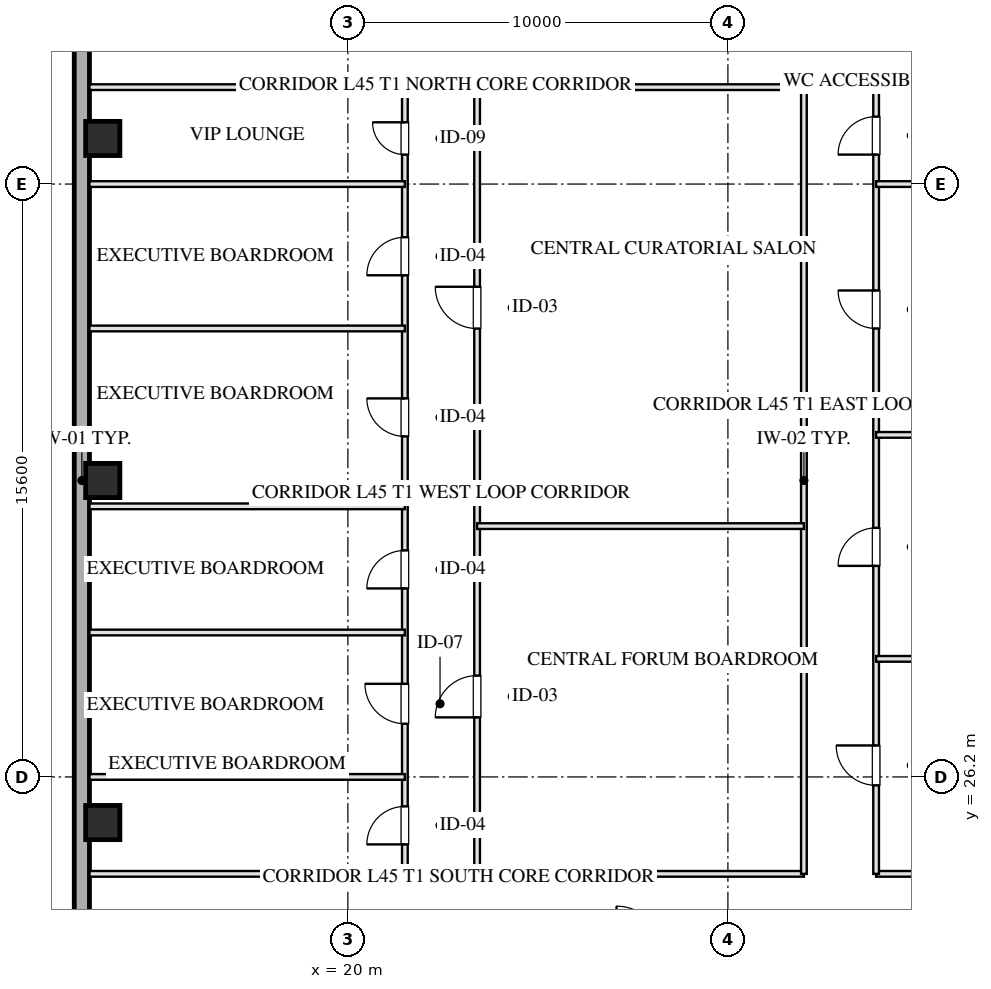
"""IFC4 building model, lengths in metres.
Left out: names, types, materials, properties, quantities, classifications, styles, units other than length and angle.
Written with IfcOpenShell. Run it as: python <this file> out.ifc"""

import sys

from ifc_helpers import new_model, si_unit, direction, frame, frame_2d, origin, origin_2d, place, context, subcontext, project, spatial, rectangle, hollow_rectangle, extrude, element, fill, save


model = new_model("IFC4")
c1 = context("Model", 3, precision=1e-05, world=origin(), true_north=direction((0.0, 1.0)))
c2 = subcontext(c1, "Body", "Model", "MODEL_VIEW")
j1 = project(units=[si_unit("LENGTHUNIT", "METRE"), si_unit("PLANEANGLEUNIT", "RADIAN")], contexts=[c1])
p1 = place(None, origin())
s1 = spatial("IfcSite", under=j1, at=p1, CompositionType="ELEMENT")
p2 = place(p1, origin())
s2 = spatial("IfcBuilding", under=s1, at=p2, CompositionType="ELEMENT")
p3 = place(p2, frame((0.0, 0.0, 170.2)))
s3 = spatial("IfcBuildingStorey", under=s2, at=p3, CompositionType="ELEMENT", Elevation=170.2)
for number, where, z_axis, x_axis in (
    (1, (13.55, 25.0, 0.0), (0.0, 0.0, 1.0), (1.0, 0.0, 0.0)),
    (2, (13.55, 34.0, 0.0), (0.0, 0.0, 1.0), (1.0, 0.0, 0.0)),
    (3, (13.55, 43.0, 0.0), (0.0, 0.0, 1.0), (1.0, 0.0, 0.0)),
):
    element("IfcColumn", number, at=place(p3, frame(where, z_axis=z_axis, x_axis=x_axis)), inside=s3, PredefinedType="COLUMN", context=c2, shape_type="SweptSolid", body=[
        extrude(hollow_rectangle(XDim=0.9, YDim=0.9, WallThickness=0.032, at=origin_2d()), origin(), (0.0, 0.0, 1.0), 3.451),
    ])
p4 = place(p3, frame((13.0, 10.8, 0.0), z_axis=(0.0, 0.0, 1.0), x_axis=(0.0, 1.0, 0.0)))
e4 = element("IfcWall", 4, at=p4, inside=s3, PredefinedType="SOLIDWALL", context=c2, shape_type="SweptSolid", body=[
    extrude(rectangle(XDim=46.4, YDim=0.4, at=frame_2d((23.2, 0.0))), origin(), (0.0, 0.0, 1.0), 2.61),
])
p5 = place(p3, frame((13.2, 23.65, 0.0), z_axis=(0.0, 0.0, 1.0), x_axis=(1.0, 0.0, 0.0)))
e5 = element("IfcWall", 5, at=p5, inside=s3, PredefinedType="PARTITIONING", context=c2, shape_type="SweptSolid", body=[
    extrude(rectangle(XDim=8.3, YDim=0.15, at=frame_2d((4.15, 0.0))), origin(), (0.0, 0.0, 1.0), 3.175),
])
p6 = place(p3, frame((23.4, 23.65, 0.0), z_axis=(0.0, 0.0, 1.0), x_axis=(1.0, 0.0, 0.0)))
e6 = element("IfcWall", 6, at=p6, inside=s3, PredefinedType="PARTITIONING", context=c2, shape_type="SweptSolid", body=[
    extrude(rectangle(XDim=8.6, YDim=0.15, at=frame_2d((4.3, 0.0))), origin(), (0.0, 0.0, 1.0), 3.175),
])
p7 = place(p3, frame((33.9, 23.65, 0.0), z_axis=(0.0, 0.0, 1.0), x_axis=(1.0, 0.0, 0.0)))
e7 = element("IfcWall", 7, at=p7, inside=s3, PredefinedType="PARTITIONING", context=c2, shape_type="SweptSolid", body=[
    extrude(rectangle(XDim=12.9, YDim=0.15, at=frame_2d((6.45, 0.0))), origin(), (0.0, 0.0, 1.0), 3.175),
])
p8 = place(p3, frame((13.2, 44.35, 0.0), z_axis=(0.0, 0.0, 1.0), x_axis=(1.0, 0.0, 0.0)))
e8 = element("IfcWall", 8, at=p8, inside=s3, PredefinedType="PARTITIONING", context=c2, shape_type="SweptSolid", body=[
    extrude(rectangle(XDim=8.3, YDim=0.15, at=frame_2d((4.15, 0.0))), origin(), (0.0, 0.0, 1.0), 3.175),
])
p9 = place(p3, frame((23.4, 44.35, 0.0), z_axis=(0.0, 0.0, 1.0), x_axis=(1.0, 0.0, 0.0)))
e9 = element("IfcWall", 9, at=p9, inside=s3, PredefinedType="PARTITIONING", context=c2, shape_type="SweptSolid", body=[
    extrude(rectangle(XDim=8.6, YDim=0.15, at=frame_2d((4.3, 0.0))), origin(), (0.0, 0.0, 1.0), 3.175),
])
p10 = place(p3, frame((33.9, 44.35, 0.0), z_axis=(0.0, 0.0, 1.0), x_axis=(1.0, 0.0, 0.0)))
e10 = element("IfcWall", 10, at=p10, inside=s3, PredefinedType="PARTITIONING", context=c2, shape_type="SweptSolid", body=[
    extrude(rectangle(XDim=12.9, YDim=0.15, at=frame_2d((6.45, 0.0))), origin(), (0.0, 0.0, 1.0), 3.175),
])
p11 = place(p3, frame((21.5, 23.65, 0.0), z_axis=(0.0, 0.0, 1.0), x_axis=(0.0, 1.0, 0.0)))
e11 = element("IfcWall", 11, at=p11, inside=s3, PredefinedType="PARTITIONING", context=c2, shape_type="SweptSolid", body=[
    extrude(rectangle(XDim=20.7, YDim=0.15, at=frame_2d((10.35, 0.0))), origin(), (0.0, 0.0, 1.0), 3.175),
])
p12 = place(p11, frame((0.775, 0.0, 0.0)))
e12 = element("IfcOpeningElement", 12, at=p12, cuts=e11, PredefinedType="OPENING", context=c2, shape_type="SweptSolid", body=[
    extrude(rectangle(XDim=1.0, YDim=2.05, at=frame_2d((0.5, 1.025))), frame((0.0, 0.085, 0.0), z_axis=(0.0, -1.0, 0.0), x_axis=(1.0, 0.0, 0.0)), (0.0, 0.0, 1.0), 0.17),
])
p13 = place(p11, frame((3.95, 0.0, 0.0)))
e13 = element("IfcOpeningElement", 13, at=p13, cuts=e11, PredefinedType="OPENING", context=c2, shape_type="SweptSolid", body=[
    extrude(rectangle(XDim=1.05, YDim=2.05, at=frame_2d((0.525, 1.025))), frame((0.0, 0.085, 0.0), z_axis=(0.0, -1.0, 0.0), x_axis=(1.0, 0.0, 0.0)), (0.0, 0.0, 1.0), 0.17),
])
p14 = place(p11, frame((7.51, 0.0, 0.0)))
e14 = element("IfcOpeningElement", 14, at=p14, cuts=e11, PredefinedType="OPENING", context=c2, shape_type="SweptSolid", body=[
    extrude(rectangle(XDim=1.0, YDim=2.05, at=frame_2d((0.5, 1.025))), frame((0.0, 0.085, 0.0), z_axis=(0.0, -1.0, 0.0), x_axis=(1.0, 0.0, 0.0)), (0.0, 0.0, 1.0), 0.17),
])
p15 = place(p11, frame((11.51, 0.0, 0.0)))
e15 = element("IfcOpeningElement", 15, at=p15, cuts=e11, PredefinedType="OPENING", context=c2, shape_type="SweptSolid", body=[
    extrude(rectangle(XDim=1.0, YDim=2.05, at=frame_2d((0.5, 1.025))), frame((0.0, 0.085, 0.0), z_axis=(0.0, -1.0, 0.0), x_axis=(1.0, 0.0, 0.0)), (0.0, 0.0, 1.0), 0.17),
])
p16 = place(p11, frame((15.75, 0.0, 0.0)))
e16 = element("IfcOpeningElement", 16, at=p16, cuts=e11, PredefinedType="OPENING", context=c2, shape_type="SweptSolid", body=[
    extrude(rectangle(XDim=1.0, YDim=2.05, at=frame_2d((0.5, 1.025))), frame((0.0, 0.085, 0.0), z_axis=(0.0, -1.0, 0.0), x_axis=(1.0, 0.0, 0.0)), (0.0, 0.0, 1.0), 0.17),
])
p17 = place(p11, frame((18.925, 0.0, 0.0)))
e17 = element("IfcOpeningElement", 17, at=p17, cuts=e11, PredefinedType="OPENING", context=c2, shape_type="SweptSolid", body=[
    extrude(rectangle(XDim=0.85, YDim=2.05, at=frame_2d((0.425, 1.025))), frame((0.0, 0.085, 0.0), z_axis=(0.0, -1.0, 0.0), x_axis=(1.0, 0.0, 0.0)), (0.0, 0.0, 1.0), 0.17),
])
p18 = place(p3, frame((23.4, 23.65, 0.0), z_axis=(0.0, 0.0, 1.0), x_axis=(0.0, 1.0, 0.0)))
e18 = element("IfcWall", 18, at=p18, inside=s3, PredefinedType="PARTITIONING", context=c2, shape_type="SweptSolid", body=[
    extrude(rectangle(XDim=20.7, YDim=0.15, at=frame_2d((10.35, 0.0))), origin(), (0.0, 0.0, 1.0), 3.175),
])
p19 = place(p18, frame((4.117, 0.0, 0.0)))
e19 = element("IfcOpeningElement", 19, at=p19, cuts=e18, PredefinedType="OPENING", context=c2, shape_type="SweptSolid", body=[
    extrude(rectangle(XDim=1.1, YDim=2.05, at=frame_2d((0.55, 1.025))), frame((0.0, 0.085, 0.0), z_axis=(0.0, -1.0, 0.0), x_axis=(1.0, 0.0, 0.0)), (0.0, 0.0, 1.0), 0.17),
])
p20 = place(p18, frame((14.347, 0.0, 0.0)))
e20 = element("IfcOpeningElement", 20, at=p20, cuts=e18, PredefinedType="OPENING", context=c2, shape_type="SweptSolid", body=[
    extrude(rectangle(XDim=1.1, YDim=2.05, at=frame_2d((0.55, 1.025))), frame((0.0, 0.085, 0.0), z_axis=(0.0, -1.0, 0.0), x_axis=(1.0, 0.0, 0.0)), (0.0, 0.0, 1.0), 0.17),
])
p21 = place(p3, frame((32.0, 23.65, 0.0), z_axis=(0.0, 0.0, 1.0), x_axis=(0.0, 1.0, 0.0)))
e21 = element("IfcWall", 21, at=p21, inside=s3, PredefinedType="PARTITIONING", context=c2, shape_type="SweptSolid", body=[
    extrude(rectangle(XDim=20.7, YDim=0.15, at=frame_2d((10.35, 0.0))), origin(), (0.0, 0.0, 1.0), 3.175),
])
p22 = place(p3, frame((33.9, 23.65, 0.0), z_axis=(0.0, 0.0, 1.0), x_axis=(0.0, 1.0, 0.0)))
e22 = element("IfcWall", 22, at=p22, inside=s3, PredefinedType="PARTITIONING", context=c2, shape_type="SweptSolid", body=[
    extrude(rectangle(XDim=20.7, YDim=0.15, at=frame_2d((10.35, 0.0))), origin(), (0.0, 0.0, 1.0), 3.175),
])
p23 = place(p22, frame((2.329, 0.0, 0.0)))
e23 = element("IfcOpeningElement", 23, at=p23, cuts=e22, PredefinedType="OPENING", context=c2, shape_type="SweptSolid", body=[
    extrude(rectangle(XDim=1.05, YDim=2.05, at=frame_2d((0.525, 1.025))), frame((0.0, 0.085, 0.0), z_axis=(0.0, -1.0, 0.0), x_axis=(1.0, 0.0, 0.0)), (0.0, 0.0, 1.0), 0.17),
])
p24 = place(p22, frame((8.104, 0.0, 0.0)))
e24 = element("IfcOpeningElement", 24, at=p24, cuts=e22, PredefinedType="OPENING", context=c2, shape_type="SweptSolid", body=[
    extrude(rectangle(XDim=1.0, YDim=2.05, at=frame_2d((0.5, 1.025))), frame((0.0, 0.085, 0.0), z_axis=(0.0, -1.0, 0.0), x_axis=(1.0, 0.0, 0.0)), (0.0, 0.0, 1.0), 0.17),
])
p25 = place(p22, frame((14.35, 0.0, 0.0)))
e25 = element("IfcOpeningElement", 25, at=p25, cuts=e22, PredefinedType="OPENING", context=c2, shape_type="SweptSolid", body=[
    extrude(rectangle(XDim=1.0, YDim=2.05, at=frame_2d((0.5, 1.025))), frame((0.0, 0.085, 0.0), z_axis=(0.0, -1.0, 0.0), x_axis=(1.0, 0.0, 0.0)), (0.0, 0.0, 1.0), 0.17),
])
p26 = place(p22, frame((18.925, 0.0, 0.0)))
e26 = element("IfcOpeningElement", 26, at=p26, cuts=e22, PredefinedType="OPENING", context=c2, shape_type="SweptSolid", body=[
    extrude(rectangle(XDim=1.0, YDim=2.05, at=frame_2d((0.5, 1.025))), frame((0.0, 0.085, 0.0), z_axis=(0.0, -1.0, 0.0), x_axis=(1.0, 0.0, 0.0)), (0.0, 0.0, 1.0), 0.17),
])
p27 = place(p3, frame((23.4, 32.8, 0.0), z_axis=(0.0, 0.0, 1.0), x_axis=(1.0, 0.0, 0.0)))
e27 = element("IfcWall", 27, at=p27, inside=s3, PredefinedType="PARTITIONING", context=c2, shape_type="SweptSolid", body=[
    extrude(rectangle(XDim=8.6, YDim=0.15, at=frame_2d((4.3, 0.0))), origin(), (0.0, 0.0, 1.0), 3.175),
])
for number, where, z_axis, x_axis in (
    (28, (13.2, 26.2, 0.0), (0.0, 0.0, 1.0), (1.0, 0.0, 0.0)),
    (29, (13.2, 30.0, 0.0), (0.0, 0.0, 1.0), (1.0, 0.0, 0.0)),
    (30, (13.2, 33.32, 0.0), (0.0, 0.0, 1.0), (1.0, 0.0, 0.0)),
    (31, (13.2, 38.0, 0.0), (0.0, 0.0, 1.0), (1.0, 0.0, 0.0)),
    (32, (13.2, 41.8, 0.0), (0.0, 0.0, 1.0), (1.0, 0.0, 0.0)),
):
    element("IfcWall", number, at=place(p3, frame(where, z_axis=z_axis, x_axis=x_axis)), inside=s3, PredefinedType="PARTITIONING", context=c2, shape_type="SweptSolid", body=[
        extrude(rectangle(XDim=8.3, YDim=0.15, at=frame_2d((4.15, 0.0))), origin(), (0.0, 0.0, 1.0), 3.175),
    ])
for number, where, z_axis, x_axis in (
    (33, (33.9, 29.307, 0.0), (0.0, 0.0, 1.0), (1.0, 0.0, 0.0)),
    (34, (33.9, 35.2, 0.0), (0.0, 0.0, 1.0), (1.0, 0.0, 0.0)),
    (35, (33.9, 41.8, 0.0), (0.0, 0.0, 1.0), (1.0, 0.0, 0.0)),
):
    element("IfcWall", number, at=place(p3, frame(where, z_axis=z_axis, x_axis=x_axis)), inside=s3, PredefinedType="PARTITIONING", context=c2, shape_type="SweptSolid", body=[
        extrude(rectangle(XDim=12.9, YDim=0.15, at=frame_2d((6.45, 0.0))), origin(), (0.0, 0.0, 1.0), 3.175),
    ])
p28 = place(p12, origin())
e36 = element("IfcDoor", 36, at=p28, inside=s3, OperationType="SINGLE_SWING_LEFT", PredefinedType="DOOR", context=c2, shape_type="SweptSolid", body=[
    extrude(rectangle(XDim=1.0, YDim=2.05, at=frame_2d((0.5, 1.025))), frame((0.0, 0.025, 0.0), z_axis=(0.0, -1.0, 0.0), x_axis=(1.0, 0.0, 0.0)), (0.0, 0.0, 1.0), 0.05),
])
fill(e12, e36)
p29 = place(p13, origin())
e37 = element("IfcDoor", 37, at=p29, inside=s3, OperationType="SINGLE_SWING_RIGHT", PredefinedType="DOOR", context=c2, shape_type="SweptSolid", body=[
    extrude(rectangle(XDim=1.05, YDim=2.05, at=frame_2d((0.525, 1.025))), frame((0.0, 0.025, 0.0), z_axis=(0.0, -1.0, 0.0), x_axis=(1.0, 0.0, 0.0)), (0.0, 0.0, 1.0), 0.05),
])
fill(e13, e37)
p30 = place(p14, origin())
e38 = element("IfcDoor", 38, at=p30, inside=s3, OperationType="SINGLE_SWING_LEFT", PredefinedType="DOOR", context=c2, shape_type="SweptSolid", body=[
    extrude(rectangle(XDim=1.0, YDim=2.05, at=frame_2d((0.5, 1.025))), frame((0.0, 0.025, 0.0), z_axis=(0.0, -1.0, 0.0), x_axis=(1.0, 0.0, 0.0)), (0.0, 0.0, 1.0), 0.05),
])
fill(e14, e38)
p31 = place(p15, origin())
e39 = element("IfcDoor", 39, at=p31, inside=s3, OperationType="SINGLE_SWING_RIGHT", PredefinedType="DOOR", context=c2, shape_type="SweptSolid", body=[
    extrude(rectangle(XDim=1.0, YDim=2.05, at=frame_2d((0.5, 1.025))), frame((0.0, 0.025, 0.0), z_axis=(0.0, -1.0, 0.0), x_axis=(1.0, 0.0, 0.0)), (0.0, 0.0, 1.0), 0.05),
])
fill(e15, e39)
p32 = place(p16, origin())
e40 = element("IfcDoor", 40, at=p32, inside=s3, OperationType="SINGLE_SWING_LEFT", PredefinedType="DOOR", context=c2, shape_type="SweptSolid", body=[
    extrude(rectangle(XDim=1.0, YDim=2.05, at=frame_2d((0.5, 1.025))), frame((0.0, 0.025, 0.0), z_axis=(0.0, -1.0, 0.0), x_axis=(1.0, 0.0, 0.0)), (0.0, 0.0, 1.0), 0.05),
])
fill(e16, e40)
p33 = place(p17, origin())
e41 = element("IfcDoor", 41, at=p33, inside=s3, OperationType="SINGLE_SWING_RIGHT", PredefinedType="DOOR", context=c2, shape_type="SweptSolid", body=[
    extrude(rectangle(XDim=0.85, YDim=2.05, at=frame_2d((0.425, 1.025))), frame((0.0, 0.025, 0.0), z_axis=(0.0, -1.0, 0.0), x_axis=(1.0, 0.0, 0.0)), (0.0, 0.0, 1.0), 0.05),
])
fill(e17, e41)
p34 = place(p19, origin())
e42 = element("IfcDoor", 42, at=p34, inside=s3, OperationType="SINGLE_SWING_LEFT", PredefinedType="DOOR", context=c2, shape_type="SweptSolid", body=[
    extrude(rectangle(XDim=1.1, YDim=2.05, at=frame_2d((0.55, 1.025))), frame((0.0, 0.025, 0.0), z_axis=(0.0, -1.0, 0.0), x_axis=(1.0, 0.0, 0.0)), (0.0, 0.0, 1.0), 0.05),
])
fill(e19, e42)
p35 = place(p20, origin())
e43 = element("IfcDoor", 43, at=p35, inside=s3, OperationType="SINGLE_SWING_RIGHT", PredefinedType="DOOR", context=c2, shape_type="SweptSolid", body=[
    extrude(rectangle(XDim=1.1, YDim=2.05, at=frame_2d((0.55, 1.025))), frame((0.0, 0.025, 0.0), z_axis=(0.0, -1.0, 0.0), x_axis=(1.0, 0.0, 0.0)), (0.0, 0.0, 1.0), 0.05),
])
fill(e20, e43)
p36 = place(p23, origin())
e44 = element("IfcDoor", 44, at=p36, inside=s3, OperationType="SINGLE_SWING_RIGHT", PredefinedType="DOOR", context=c2, shape_type="SweptSolid", body=[
    extrude(rectangle(XDim=1.05, YDim=2.05, at=frame_2d((0.525, 1.025))), frame((0.0, 0.025, 0.0), z_axis=(0.0, -1.0, 0.0), x_axis=(1.0, 0.0, 0.0)), (0.0, 0.0, 1.0), 0.05),
])
fill(e23, e44)
p37 = place(p24, origin())
e45 = element("IfcDoor", 45, at=p37, inside=s3, OperationType="SINGLE_SWING_LEFT", PredefinedType="DOOR", context=c2, shape_type="SweptSolid", body=[
    extrude(rectangle(XDim=1.0, YDim=2.05, at=frame_2d((0.5, 1.025))), frame((0.0, 0.025, 0.0), z_axis=(0.0, -1.0, 0.0), x_axis=(1.0, 0.0, 0.0)), (0.0, 0.0, 1.0), 0.05),
])
fill(e24, e45)
p38 = place(p25, origin())
e46 = element("IfcDoor", 46, at=p38, inside=s3, OperationType="SINGLE_SWING_RIGHT", PredefinedType="DOOR", context=c2, shape_type="SweptSolid", body=[
    extrude(rectangle(XDim=1.0, YDim=2.05, at=frame_2d((0.5, 1.025))), frame((0.0, 0.025, 0.0), z_axis=(0.0, -1.0, 0.0), x_axis=(1.0, 0.0, 0.0)), (0.0, 0.0, 1.0), 0.05),
])
fill(e25, e46)
p39 = place(p26, origin())
e47 = element("IfcDoor", 47, at=p39, inside=s3, OperationType="SINGLE_SWING_LEFT", PredefinedType="DOOR", context=c2, shape_type="SweptSolid", body=[
    extrude(rectangle(XDim=1.0, YDim=2.05, at=frame_2d((0.5, 1.025))), frame((0.0, 0.025, 0.0), z_axis=(0.0, -1.0, 0.0), x_axis=(1.0, 0.0, 0.0)), (0.0, 0.0, 1.0), 0.05),
])
fill(e26, e47)
save(model, sys.argv[1])
